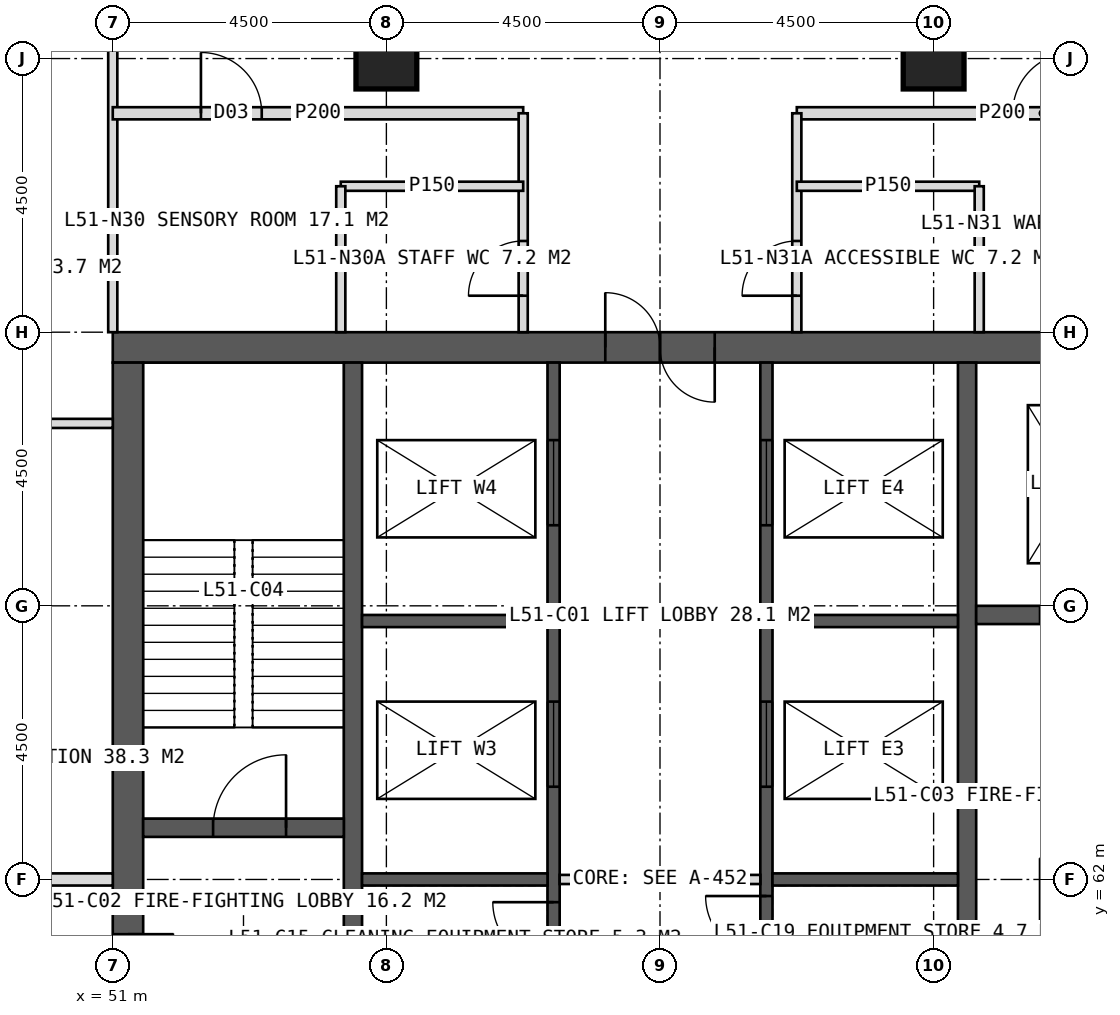
"""IFC4 building model, lengths in metres.
Left out: names, types, materials, properties, quantities, classifications, styles, units other than length and angle.
Written with IfcOpenShell. Run it as: python <this file> out.ifc"""

import sys

from ifc_helpers import new_model, si_unit, direction, frame, frame_2d, origin, origin_2d, place, context, subcontext, project, spatial, rectangle, hollow_rectangle, extrude, element, fill, save


model = new_model("IFC4")
c1 = context("Model", 3, precision=1e-05, world=origin(), true_north=direction((0.0, 1.0)))
c2 = subcontext(c1, "Body", "Model", "MODEL_VIEW")
j1 = project(units=[si_unit("LENGTHUNIT", "METRE"), si_unit("PLANEANGLEUNIT", "RADIAN")], contexts=[c1])
p1 = place(None, origin())
s1 = spatial("IfcSite", under=j1, at=p1, CompositionType="ELEMENT")
p2 = place(p1, origin())
s2 = spatial("IfcBuilding", under=s1, at=p2, CompositionType="ELEMENT")
p3 = place(p2, frame((0.0, 0.0, 213.0)))
s3 = spatial("IfcBuildingStorey", under=s2, at=p3, CompositionType="ELEMENT", Elevation=213.0)
p4 = place(p3, frame((51.0, 70.75, 0.0), z_axis=(0.0, 0.0, 1.0), x_axis=(1.0, 0.0, 0.0)))
e1 = element("IfcWall", 1, at=p4, inside=s3, PredefinedType="SHEAR", context=c2, shape_type="SweptSolid", body=[
    extrude(rectangle(XDim=18.0, YDim=0.5, at=frame_2d((9.0, 0.0))), origin(), (0.0, 0.0, 1.0), 4.0),
])
p5 = place(p4, frame((8.1, 0.0, 0.0)))
e2 = element("IfcOpeningElement", 2, at=p5, cuts=e1, PredefinedType="OPENING", context=c2, shape_type="SweptSolid", body=[
    extrude(rectangle(XDim=1.8, YDim=2.2, at=frame_2d((0.9, 1.1))), frame((0.0, 0.26, 0.0), z_axis=(0.0, -1.0, 0.0), x_axis=(1.0, 0.0, 0.0)), (0.0, 0.0, 1.0), 0.52),
])
p6 = place(p3, frame((51.25, 53.5, 0.0), z_axis=(0.0, 0.0, 1.0), x_axis=(0.0, 1.0, 0.0)))
e3 = element("IfcWall", 3, at=p6, inside=s3, PredefinedType="SHEAR", context=c2, shape_type="SweptSolid", body=[
    extrude(rectangle(XDim=17.0, YDim=0.5, at=frame_2d((8.5, 0.0))), origin(), (0.0, 0.0, 1.0), 4.0),
])
p7 = place(p6, frame((6.1, 0.0, 0.0)))
e4 = element("IfcOpeningElement", 4, at=p7, cuts=e3, PredefinedType="OPENING", context=c2, shape_type="SweptSolid", body=[
    extrude(rectangle(XDim=1.5, YDim=2.2, at=frame_2d((0.75, 1.1))), frame((0.0, 0.26, 0.0), z_axis=(0.0, -1.0, 0.0), x_axis=(1.0, 0.0, 0.0)), (0.0, 0.0, 1.0), 0.52),
])
for number, where, z_axis, x_axis in (
    (5, (54.95, 53.5, 0.0), (0.0, 0.0, 1.0), (0.0, 1.0, 0.0)),
    (6, (65.05, 53.5, 0.0), (0.0, 0.0, 1.0), (0.0, 1.0, 0.0)),
):
    element("IfcWall", number, at=place(p3, frame(where, z_axis=z_axis, x_axis=x_axis)), inside=s3, PredefinedType="SHEAR", context=c2, shape_type="SweptSolid", body=[
        extrude(rectangle(XDim=17.0, YDim=0.3, at=frame_2d((8.5, 0.0))), origin(), (0.0, 0.0, 1.0), 4.0),
    ])
p8 = place(p3, frame((58.25, 53.5, 0.0), z_axis=(0.0, 0.0, 1.0), x_axis=(0.0, 1.0, 0.0)))
e7 = element("IfcWall", 7, at=p8, inside=s3, PredefinedType="SHEAR", context=c2, shape_type="SweptSolid", body=[
    extrude(rectangle(XDim=17.0, YDim=0.2, at=frame_2d((8.5, 0.0))), origin(), (0.0, 0.0, 1.0), 4.0),
])
p9 = place(p8, frame((0.496, 0.0, 0.0)))
e8 = element("IfcOpeningElement", 8, at=p9, cuts=e7, PredefinedType="OPENING", context=c2, shape_type="SweptSolid", body=[
    extrude(rectangle(XDim=1.0, YDim=2.1, at=frame_2d((0.5, 1.05))), frame((0.0, 0.11, 0.0), z_axis=(0.0, -1.0, 0.0), x_axis=(1.0, 0.0, 0.0)), (0.0, 0.0, 1.0), 0.22),
])
p10 = place(p8, frame((2.646, 0.0, 0.0)))
e9 = element("IfcOpeningElement", 9, at=p10, cuts=e7, PredefinedType="OPENING", context=c2, shape_type="SweptSolid", body=[
    extrude(rectangle(XDim=1.0, YDim=2.1, at=frame_2d((0.5, 1.05))), frame((0.0, 0.11, 0.0), z_axis=(0.0, -1.0, 0.0), x_axis=(1.0, 0.0, 0.0)), (0.0, 0.0, 1.0), 0.22),
])
p11 = place(p8, frame((5.027, 0.0, 0.0)))
e10 = element("IfcOpeningElement", 10, at=p11, cuts=e7, PredefinedType="OPENING", context=c2, shape_type="SweptSolid", body=[
    extrude(rectangle(XDim=1.0, YDim=2.1, at=frame_2d((0.5, 1.05))), frame((0.0, 0.11, 0.0), z_axis=(0.0, -1.0, 0.0), x_axis=(1.0, 0.0, 0.0)), (0.0, 0.0, 1.0), 0.22),
])
p12 = place(p8, frame((7.126, 0.0, 0.0)))
e11 = element("IfcOpeningElement", 11, at=p12, cuts=e7, PredefinedType="OPENING", context=c2, shape_type="SweptSolid", body=[
    extrude(rectangle(XDim=1.0, YDim=2.1, at=frame_2d((0.5, 1.05))), frame((0.0, 0.11, 0.0), z_axis=(0.0, -1.0, 0.0), x_axis=(1.0, 0.0, 0.0)), (0.0, 0.0, 1.0), 0.22),
])
p13 = place(p8, frame((10.025, 0.0, 0.0)))
e12 = element("IfcOpeningElement", 12, at=p13, cuts=e7, PredefinedType="OPENING", context=c2, shape_type="SweptSolid", body=[
    extrude(rectangle(XDim=1.4, YDim=2.2, at=frame_2d((0.7, 1.1))), frame((0.0, 0.11, 0.0), z_axis=(0.0, -1.0, 0.0), x_axis=(1.0, 0.0, 0.0)), (0.0, 0.0, 1.0), 0.22),
])
p14 = place(p8, frame((14.325, 0.0, 0.0)))
e13 = element("IfcOpeningElement", 13, at=p14, cuts=e7, PredefinedType="OPENING", context=c2, shape_type="SweptSolid", body=[
    extrude(rectangle(XDim=1.4, YDim=2.2, at=frame_2d((0.7, 1.1))), frame((0.0, 0.11, 0.0), z_axis=(0.0, -1.0, 0.0), x_axis=(1.0, 0.0, 0.0)), (0.0, 0.0, 1.0), 0.22),
])
p15 = place(p3, frame((61.75, 53.5, 0.0), z_axis=(0.0, 0.0, 1.0), x_axis=(0.0, 1.0, 0.0)))
e14 = element("IfcWall", 14, at=p15, inside=s3, PredefinedType="SHEAR", context=c2, shape_type="SweptSolid", body=[
    extrude(rectangle(XDim=17.0, YDim=0.2, at=frame_2d((8.5, 0.0))), origin(), (0.0, 0.0, 1.0), 4.0),
])
p16 = place(p15, frame((0.393, 0.0, 0.0)))
e15 = element("IfcOpeningElement", 15, at=p16, cuts=e14, PredefinedType="OPENING", context=c2, shape_type="SweptSolid", body=[
    extrude(rectangle(XDim=1.0, YDim=2.1, at=frame_2d((0.5, 1.05))), frame((0.0, 0.11, 0.0), z_axis=(0.0, -1.0, 0.0), x_axis=(1.0, 0.0, 0.0)), (0.0, 0.0, 1.0), 0.22),
])
p17 = place(p15, frame((2.542, 0.0, 0.0)))
e16 = element("IfcOpeningElement", 16, at=p17, cuts=e14, PredefinedType="OPENING", context=c2, shape_type="SweptSolid", body=[
    extrude(rectangle(XDim=1.0, YDim=2.1, at=frame_2d((0.5, 1.05))), frame((0.0, 0.11, 0.0), z_axis=(0.0, -1.0, 0.0), x_axis=(1.0, 0.0, 0.0)), (0.0, 0.0, 1.0), 0.22),
])
p18 = place(p15, frame((5.127, 0.0, 0.0)))
e17 = element("IfcOpeningElement", 17, at=p18, cuts=e14, PredefinedType="OPENING", context=c2, shape_type="SweptSolid", body=[
    extrude(rectangle(XDim=1.0, YDim=2.1, at=frame_2d((0.5, 1.05))), frame((0.0, 0.11, 0.0), z_axis=(0.0, -1.0, 0.0), x_axis=(1.0, 0.0, 0.0)), (0.0, 0.0, 1.0), 0.22),
])
p19 = place(p15, frame((7.228, 0.0, 0.0)))
e18 = element("IfcOpeningElement", 18, at=p19, cuts=e14, PredefinedType="OPENING", context=c2, shape_type="SweptSolid", body=[
    extrude(rectangle(XDim=1.0, YDim=2.1, at=frame_2d((0.5, 1.05))), frame((0.0, 0.11, 0.0), z_axis=(0.0, -1.0, 0.0), x_axis=(1.0, 0.0, 0.0)), (0.0, 0.0, 1.0), 0.22),
])
p20 = place(p15, frame((10.025, 0.0, 0.0)))
e19 = element("IfcOpeningElement", 19, at=p20, cuts=e14, PredefinedType="OPENING", context=c2, shape_type="SweptSolid", body=[
    extrude(rectangle(XDim=1.4, YDim=2.2, at=frame_2d((0.7, 1.1))), frame((0.0, 0.11, 0.0), z_axis=(0.0, -1.0, 0.0), x_axis=(1.0, 0.0, 0.0)), (0.0, 0.0, 1.0), 0.22),
])
p21 = place(p15, frame((14.325, 0.0, 0.0)))
e20 = element("IfcOpeningElement", 20, at=p21, cuts=e14, PredefinedType="OPENING", context=c2, shape_type="SweptSolid", body=[
    extrude(rectangle(XDim=1.4, YDim=2.2, at=frame_2d((0.7, 1.1))), frame((0.0, 0.11, 0.0), z_axis=(0.0, -1.0, 0.0), x_axis=(1.0, 0.0, 0.0)), (0.0, 0.0, 1.0), 0.22),
])
for number, where, z_axis, x_axis in (
    (21, (55.1, 62.0, 0.0), (0.0, 0.0, 1.0), (1.0, 0.0, 0.0)),
    (22, (61.85, 62.0, 0.0), (0.0, 0.0, 1.0), (1.0, 0.0, 0.0)),
    (23, (55.1, 66.25, 0.0), (0.0, 0.0, 1.0), (1.0, 0.0, 0.0)),
    (24, (61.85, 66.25, 0.0), (0.0, 0.0, 1.0), (1.0, 0.0, 0.0)),
):
    element("IfcWall", number, at=place(p3, frame(where, z_axis=z_axis, x_axis=x_axis)), inside=s3, PredefinedType="SHEAR", context=c2, shape_type="SweptSolid", body=[
        extrude(rectangle(XDim=3.05, YDim=0.2, at=frame_2d((1.525, 0.0))), origin(), (0.0, 0.0, 1.0), 4.0),
    ])
p22 = place(p3, frame((51.5, 62.85, 0.0), z_axis=(0.0, 0.0, 1.0), x_axis=(1.0, 0.0, 0.0)))
e25 = element("IfcWall", 25, at=p22, inside=s3, PredefinedType="SHEAR", context=c2, shape_type="SweptSolid", body=[
    extrude(rectangle(XDim=3.3, YDim=0.3, at=frame_2d((1.65, 0.0))), origin(), (0.0, 0.0, 1.0), 4.0),
])
p23 = place(p22, frame((1.15, 0.0, 0.0)))
e26 = element("IfcOpeningElement", 26, at=p23, cuts=e25, PredefinedType="OPENING", context=c2, shape_type="SweptSolid", body=[
    extrude(rectangle(XDim=1.2, YDim=2.1, at=frame_2d((0.6, 1.05))), frame((0.0, 0.16, 0.0), z_axis=(0.0, -1.0, 0.0), x_axis=(1.0, 0.0, 0.0)), (0.0, 0.0, 1.0), 0.32),
])
p24 = place(p3, frame((65.2, 61.15, 0.0), z_axis=(0.0, 0.0, 1.0), x_axis=(1.0, 0.0, 0.0)))
e27 = element("IfcWall", 27, at=p24, inside=s3, PredefinedType="SHEAR", context=c2, shape_type="SweptSolid", body=[
    extrude(rectangle(XDim=3.3, YDim=0.3, at=frame_2d((1.65, 0.0))), origin(), (0.0, 0.0, 1.0), 4.0),
])
p25 = place(p24, frame((1.05, 0.0, 0.0)))
e28 = element("IfcOpeningElement", 28, at=p25, cuts=e27, PredefinedType="OPENING", context=c2, shape_type="SweptSolid", body=[
    extrude(rectangle(XDim=1.2, YDim=2.1, at=frame_2d((0.6, 1.05))), frame((0.0, 0.16, 0.0), z_axis=(0.0, -1.0, 0.0), x_axis=(1.0, 0.0, 0.0)), (0.0, 0.0, 1.0), 0.32),
])
p26 = place(p3, frame((65.2, 66.35, 0.0), z_axis=(0.0, 0.0, 1.0), x_axis=(1.0, 0.0, 0.0)))
e29 = element("IfcWall", 29, at=p26, inside=s3, PredefinedType="SHEAR", context=c2, shape_type="SweptSolid", body=[
    extrude(rectangle(XDim=3.3, YDim=0.3, at=frame_2d((1.65, 0.0))), origin(), (0.0, 0.0, 1.0), 4.0),
])
p27 = place(p26, frame((1.05, 0.0, 0.0)))
e30 = element("IfcOpeningElement", 30, at=p27, cuts=e29, PredefinedType="OPENING", context=c2, shape_type="SweptSolid", body=[
    extrude(rectangle(XDim=1.2, YDim=2.2, at=frame_2d((0.6, 1.1))), frame((0.0, 0.16, 0.0), z_axis=(0.0, -1.0, 0.0), x_axis=(1.0, 0.0, 0.0)), (0.0, 0.0, 1.0), 0.32),
])
for number, where, z_axis, x_axis in (
    (31, (55.5, 75.5, 0.0), (0.0, 0.0, 1.0), (1.0, 0.0, 0.0)),
    (32, (64.5, 75.5, 0.0), (0.0, 0.0, 1.0), (1.0, 0.0, 0.0)),
):
    element("IfcColumn", number, at=place(p3, frame(where, z_axis=z_axis, x_axis=x_axis)), inside=s3, PredefinedType="COLUMN", context=c2, shape_type="SweptSolid", body=[
        extrude(hollow_rectangle(XDim=1.0, YDim=1.0, WallThickness=0.1, at=origin_2d()), origin(), (0.0, 0.0, 1.0), 4.0),
    ])
p28 = place(p3, frame((51.0, 71.0, 0.0), z_axis=(0.0, 0.0, 1.0), x_axis=(0.0, 1.0, 0.0)))
e33 = element("IfcWall", 33, at=p28, inside=s3, PredefinedType="PARTITIONING", context=c2, shape_type="SweptSolid", body=[
    extrude(rectangle(XDim=5.1, YDim=0.15, at=frame_2d((2.55, 0.0))), origin(), (0.0, 0.0, 1.0), 3.75),
])
p29 = place(p3, frame((51.0, 74.6, 0.0), z_axis=(0.0, 0.0, 1.0), x_axis=(1.0, 0.0, 0.0)))
e34 = element("IfcWall", 34, at=p29, inside=s3, PredefinedType="PARTITIONING", context=c2, shape_type="SweptSolid", body=[
    extrude(rectangle(XDim=6.75, YDim=0.2, at=frame_2d((3.375, 0.0))), origin(), (0.0, 0.0, 1.0), 3.75),
])
p30 = place(p29, frame((1.45, 0.0, 0.0)))
e35 = element("IfcOpeningElement", 35, at=p30, cuts=e34, PredefinedType="OPENING", context=c2, shape_type="SweptSolid", body=[
    extrude(rectangle(XDim=1.0, YDim=2.1, at=frame_2d((0.5, 1.05))), frame((0.0, 0.11, 0.0), z_axis=(0.0, -1.0, 0.0), x_axis=(1.0, 0.0, 0.0)), (0.0, 0.0, 1.0), 0.22),
])
p31 = place(p3, frame((62.25, 74.6, 0.0), z_axis=(0.0, 0.0, 1.0), x_axis=(1.0, 0.0, 0.0)))
e36 = element("IfcWall", 36, at=p31, inside=s3, PredefinedType="PARTITIONING", context=c2, shape_type="SweptSolid", body=[
    extrude(rectangle(XDim=6.75, YDim=0.2, at=frame_2d((3.375, 0.0))), origin(), (0.0, 0.0, 1.0), 3.75),
])
p32 = place(p31, frame((3.55, 0.0, 0.0)))
e37 = element("IfcOpeningElement", 37, at=p32, cuts=e36, PredefinedType="OPENING", context=c2, shape_type="SweptSolid", body=[
    extrude(rectangle(XDim=1.0, YDim=2.1, at=frame_2d((0.5, 1.05))), frame((0.0, 0.11, 0.0), z_axis=(0.0, -1.0, 0.0), x_axis=(1.0, 0.0, 0.0)), (0.0, 0.0, 1.0), 0.22),
])
p33 = place(p3, frame((57.75, 71.0, 0.0), z_axis=(0.0, 0.0, 1.0), x_axis=(0.0, 1.0, 0.0)))
e38 = element("IfcWall", 38, at=p33, inside=s3, PredefinedType="PARTITIONING", context=c2, shape_type="SweptSolid", body=[
    extrude(rectangle(XDim=3.6, YDim=0.15, at=frame_2d((1.8, 0.0))), origin(), (0.0, 0.0, 1.0), 3.75),
])
p34 = place(p33, frame((0.6, 0.0, 0.0)))
e39 = element("IfcOpeningElement", 39, at=p34, cuts=e38, PredefinedType="OPENING", context=c2, shape_type="SweptSolid", body=[
    extrude(rectangle(XDim=0.9, YDim=2.1, at=frame_2d((0.45, 1.05))), frame((0.0, 0.085, 0.0), z_axis=(0.0, -1.0, 0.0), x_axis=(1.0, 0.0, 0.0)), (0.0, 0.0, 1.0), 0.17),
])
p35 = place(p3, frame((62.25, 71.0, 0.0), z_axis=(0.0, 0.0, 1.0), x_axis=(0.0, 1.0, 0.0)))
e40 = element("IfcWall", 40, at=p35, inside=s3, PredefinedType="PARTITIONING", context=c2, shape_type="SweptSolid", body=[
    extrude(rectangle(XDim=3.6, YDim=0.15, at=frame_2d((1.8, 0.0))), origin(), (0.0, 0.0, 1.0), 3.75),
])
p36 = place(p35, frame((0.6, 0.0, 0.0)))
e41 = element("IfcOpeningElement", 41, at=p36, cuts=e40, PredefinedType="OPENING", context=c2, shape_type="SweptSolid", body=[
    extrude(rectangle(XDim=0.9, YDim=2.1, at=frame_2d((0.45, 1.05))), frame((0.0, 0.085, 0.0), z_axis=(0.0, -1.0, 0.0), x_axis=(1.0, 0.0, 0.0)), (0.0, 0.0, 1.0), 0.17),
])
p37 = place(p3, frame((54.75, 73.4, 0.0), z_axis=(0.0, 0.0, 1.0), x_axis=(1.0, 0.0, 0.0)))
e42 = element("IfcWall", 42, at=p37, inside=s3, PredefinedType="PARTITIONING", context=c2, shape_type="SweptSolid", body=[
    extrude(rectangle(XDim=3.0, YDim=0.15, at=frame_2d((1.5, 0.0))), origin(), (0.0, 0.0, 1.0), 3.75),
])
p38 = place(p3, frame((54.75, 71.0, 0.0), z_axis=(0.0, 0.0, 1.0), x_axis=(0.0, 1.0, 0.0)))
e43 = element("IfcWall", 43, at=p38, inside=s3, PredefinedType="PARTITIONING", context=c2, shape_type="SweptSolid", body=[
    extrude(rectangle(XDim=2.4, YDim=0.15, at=frame_2d((1.2, 0.0))), origin(), (0.0, 0.0, 1.0), 3.75),
])
p39 = place(p3, frame((62.25, 73.4, 0.0), z_axis=(0.0, 0.0, 1.0), x_axis=(1.0, 0.0, 0.0)))
e44 = element("IfcWall", 44, at=p39, inside=s3, PredefinedType="PARTITIONING", context=c2, shape_type="SweptSolid", body=[
    extrude(rectangle(XDim=3.0, YDim=0.15, at=frame_2d((1.5, 0.0))), origin(), (0.0, 0.0, 1.0), 3.75),
])
p40 = place(p3, frame((65.25, 71.0, 0.0), z_axis=(0.0, 0.0, 1.0), x_axis=(0.0, 1.0, 0.0)))
e45 = element("IfcWall", 45, at=p40, inside=s3, PredefinedType="PARTITIONING", context=c2, shape_type="SweptSolid", body=[
    extrude(rectangle(XDim=2.4, YDim=0.15, at=frame_2d((1.2, 0.0))), origin(), (0.0, 0.0, 1.0), 3.75),
])
p41 = place(p3, frame((51.0, 62.0, 0.0), z_axis=(0.0, 0.0, 1.0), x_axis=(-1.0, 0.0, 0.0)))
e46 = element("IfcWall", 46, at=p41, inside=s3, PredefinedType="SOLIDWALL", context=c2, shape_type="SweptSolid", body=[
    extrude(rectangle(XDim=5.1, YDim=0.2, at=frame_2d((2.55, 0.0))), origin(), (0.0, 0.0, 1.0), 2.95),
])
p42 = place(p3, frame((51.0, 69.5, 0.0), z_axis=(0.0, 0.0, 1.0), x_axis=(-1.0, 0.0, 0.0)))
e47 = element("IfcWall", 47, at=p42, inside=s3, PredefinedType="PARTITIONING", context=c2, shape_type="SweptSolid", body=[
    extrude(rectangle(XDim=5.1, YDim=0.15, at=frame_2d((2.55, 0.0))), origin(), (0.0, 0.0, 1.0), 3.75),
])
p43 = place(p3, frame((58.35, 62.0, 0.0), z_axis=(0.0, 0.0, 1.0), x_axis=(1.0, 0.0, 0.0)))
e48 = element("IfcWall", 48, at=p43, inside=s3, PredefinedType="PARTITIONING", context=c2, shape_type="SweptSolid", body=[
    extrude(rectangle(XDim=3.3, YDim=0.15, at=frame_2d((1.65, 0.0))), origin(), (0.0, 0.0, 1.0), 3.75),
])
p44 = place(p34, origin())
e49 = element("IfcDoor", 49, at=p44, inside=s3, OperationType="SINGLE_SWING_LEFT", PredefinedType="DOOR", context=c2, shape_type="SweptSolid", body=[
    extrude(rectangle(XDim=0.9, YDim=2.1, at=frame_2d((0.45, 1.05))), frame((0.0, 0.025, 0.0), z_axis=(0.0, -1.0, 0.0), x_axis=(1.0, 0.0, 0.0)), (0.0, 0.0, 1.0), 0.05),
])
fill(e39, e49)
p45 = place(p30, origin())
e50 = element("IfcDoor", 50, at=p45, inside=s3, OperationType="SINGLE_SWING_LEFT", PredefinedType="DOOR", context=c2, shape_type="SweptSolid", body=[
    extrude(rectangle(XDim=1.0, YDim=2.1, at=frame_2d((0.5, 1.05))), frame((0.0, 0.025, 0.0), z_axis=(0.0, -1.0, 0.0), x_axis=(1.0, 0.0, 0.0)), (0.0, 0.0, 1.0), 0.05),
])
fill(e35, e50)
p46 = place(p36, origin())
e51 = element("IfcDoor", 51, at=p46, inside=s3, OperationType="SINGLE_SWING_LEFT", PredefinedType="DOOR", context=c2, shape_type="SweptSolid", body=[
    extrude(rectangle(XDim=0.9, YDim=2.1, at=frame_2d((0.45, 1.05))), frame((0.0, 0.025, 0.0), z_axis=(0.0, -1.0, 0.0), x_axis=(1.0, 0.0, 0.0)), (0.0, 0.0, 1.0), 0.05),
])
fill(e41, e51)
p47 = place(p32, origin())
e52 = element("IfcDoor", 52, at=p47, inside=s3, OperationType="SINGLE_SWING_RIGHT", PredefinedType="DOOR", context=c2, shape_type="SweptSolid", body=[
    extrude(rectangle(XDim=1.0, YDim=2.1, at=frame_2d((0.5, 1.05))), frame((0.0, 0.025, 0.0), z_axis=(0.0, -1.0, 0.0), x_axis=(1.0, 0.0, 0.0)), (0.0, 0.0, 1.0), 0.05),
])
fill(e37, e52)
p48 = place(p5, origin())
e53 = element("IfcDoor", 53, at=p48, inside=s3, OperationType="DOUBLE_DOOR_SINGLE_SWING", PredefinedType="DOOR", context=c2, shape_type="SweptSolid", body=[
    extrude(rectangle(XDim=1.8, YDim=2.2, at=frame_2d((0.9, 1.1))), frame((0.0, 0.025, 0.0), z_axis=(0.0, -1.0, 0.0), x_axis=(1.0, 0.0, 0.0)), (0.0, 0.0, 1.0), 0.05),
])
fill(e2, e53)
p49 = place(p7, origin())
e54 = element("IfcDoor", 54, at=p49, inside=s3, OperationType="DOUBLE_DOOR_SINGLE_SWING", PredefinedType="DOOR", context=c2, shape_type="SweptSolid", body=[
    extrude(rectangle(XDim=1.5, YDim=2.2, at=frame_2d((0.75, 1.1))), frame((0.0, 0.025, 0.0), z_axis=(0.0, -1.0, 0.0), x_axis=(1.0, 0.0, 0.0)), (0.0, 0.0, 1.0), 0.05),
])
fill(e4, e54)
p50 = place(p23, origin())
e55 = element("IfcDoor", 55, at=p50, inside=s3, OperationType="SINGLE_SWING_RIGHT", PredefinedType="DOOR", context=c2, shape_type="SweptSolid", body=[
    extrude(rectangle(XDim=1.2, YDim=2.1, at=frame_2d((0.6, 1.05))), frame((0.0, 0.025, 0.0), z_axis=(0.0, -1.0, 0.0), x_axis=(1.0, 0.0, 0.0)), (0.0, 0.0, 1.0), 0.05),
])
fill(e26, e55)
p51 = place(p12, origin())
e56 = element("IfcDoor", 56, at=p51, inside=s3, OperationType="SINGLE_SWING_RIGHT", PredefinedType="DOOR", context=c2, shape_type="SweptSolid", body=[
    extrude(rectangle(XDim=1.0, YDim=2.1, at=frame_2d((0.5, 1.05))), frame((0.0, 0.025, 0.0), z_axis=(0.0, -1.0, 0.0), x_axis=(1.0, 0.0, 0.0)), (0.0, 0.0, 1.0), 0.05),
])
fill(e11, e56)
p52 = place(p19, origin())
e57 = element("IfcDoor", 57, at=p52, inside=s3, OperationType="SINGLE_SWING_RIGHT", PredefinedType="DOOR", context=c2, shape_type="SweptSolid", body=[
    extrude(rectangle(XDim=1.0, YDim=2.1, at=frame_2d((0.5, 1.05))), frame((0.0, 0.025, 0.0), z_axis=(0.0, -1.0, 0.0), x_axis=(1.0, 0.0, 0.0)), (0.0, 0.0, 1.0), 0.05),
])
fill(e18, e57)
p53 = place(p13, origin())
e58 = element("IfcDoor", 58, at=p53, inside=s3, OperationType="SLIDING_TO_LEFT", PredefinedType="DOOR", context=c2, shape_type="SweptSolid", body=[
    extrude(rectangle(XDim=1.4, YDim=2.2, at=frame_2d((0.7, 1.1))), frame((0.0, 0.025, 0.0), z_axis=(0.0, -1.0, 0.0), x_axis=(1.0, 0.0, 0.0)), (0.0, 0.0, 1.0), 0.05),
])
fill(e12, e58)
p54 = place(p20, origin())
e59 = element("IfcDoor", 59, at=p54, inside=s3, OperationType="SLIDING_TO_LEFT", PredefinedType="DOOR", context=c2, shape_type="SweptSolid", body=[
    extrude(rectangle(XDim=1.4, YDim=2.2, at=frame_2d((0.7, 1.1))), frame((0.0, 0.025, 0.0), z_axis=(0.0, -1.0, 0.0), x_axis=(1.0, 0.0, 0.0)), (0.0, 0.0, 1.0), 0.05),
])
fill(e19, e59)
p55 = place(p14, origin())
e60 = element("IfcDoor", 60, at=p55, inside=s3, OperationType="SLIDING_TO_LEFT", PredefinedType="DOOR", context=c2, shape_type="SweptSolid", body=[
    extrude(rectangle(XDim=1.4, YDim=2.2, at=frame_2d((0.7, 1.1))), frame((0.0, 0.025, 0.0), z_axis=(0.0, -1.0, 0.0), x_axis=(1.0, 0.0, 0.0)), (0.0, 0.0, 1.0), 0.05),
])
fill(e13, e60)
p56 = place(p21, origin())
e61 = element("IfcDoor", 61, at=p56, inside=s3, OperationType="SLIDING_TO_LEFT", PredefinedType="DOOR", context=c2, shape_type="SweptSolid", body=[
    extrude(rectangle(XDim=1.4, YDim=2.2, at=frame_2d((0.7, 1.1))), frame((0.0, 0.025, 0.0), z_axis=(0.0, -1.0, 0.0), x_axis=(1.0, 0.0, 0.0)), (0.0, 0.0, 1.0), 0.05),
])
fill(e20, e61)
save(model, sys.argv[1])
